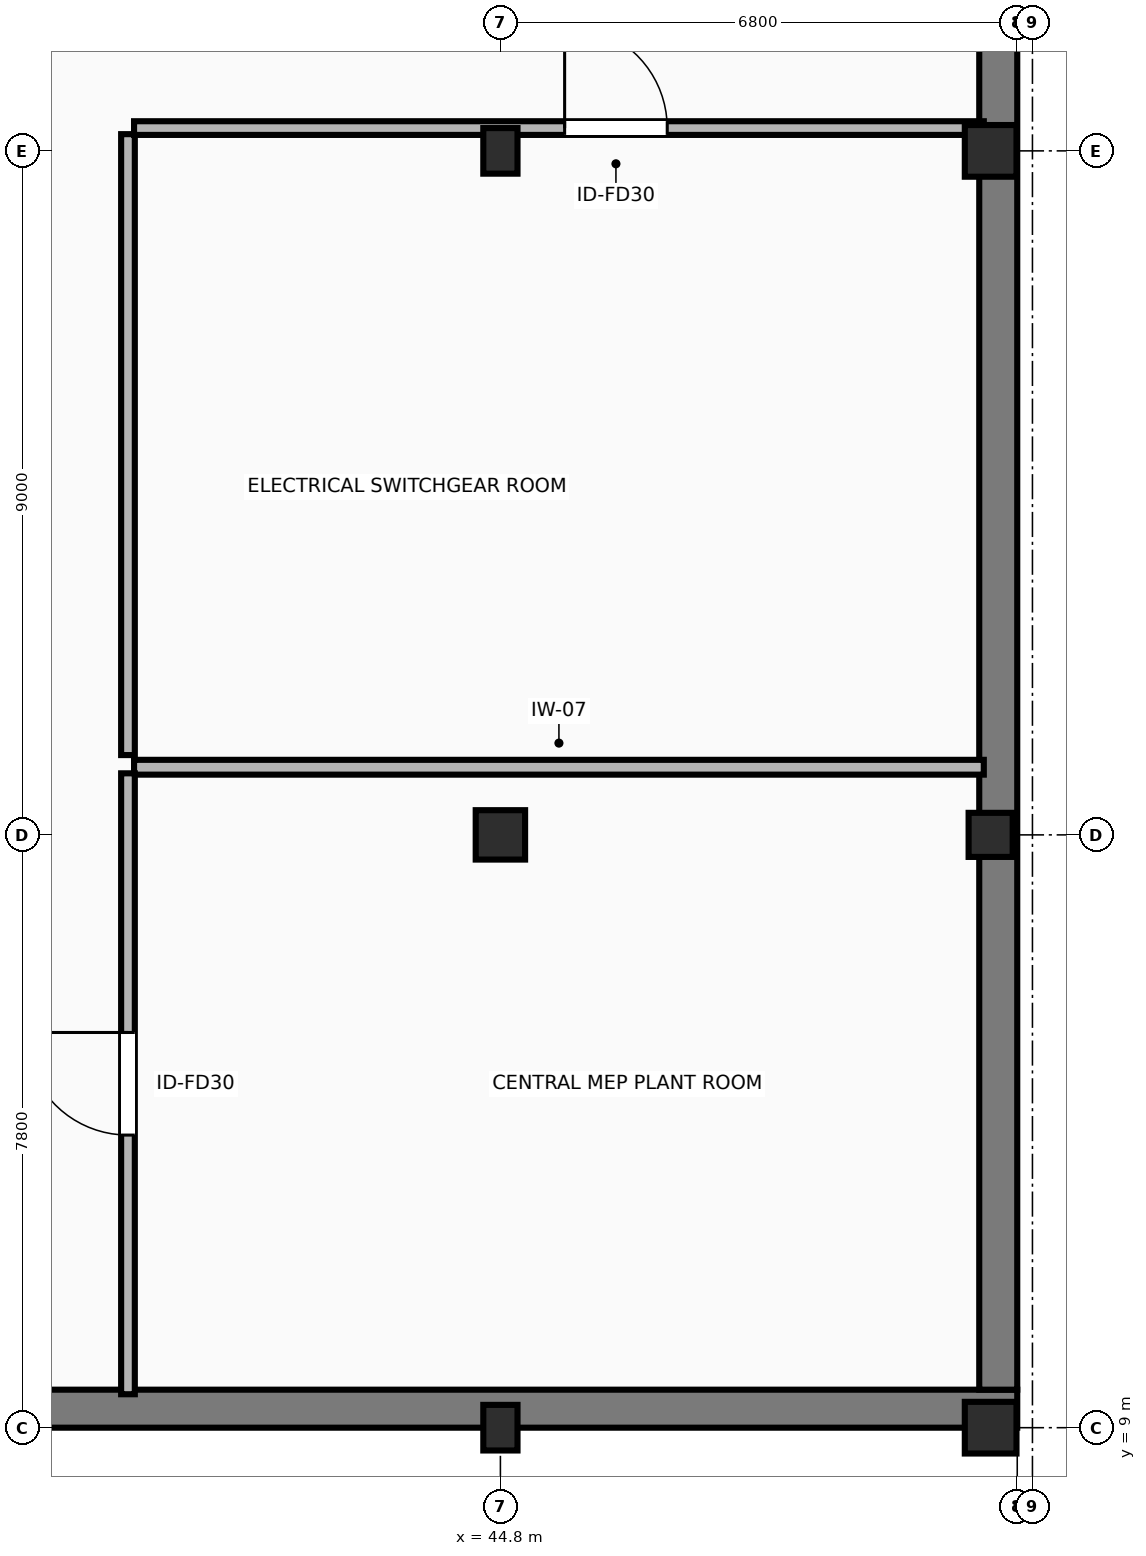
"""IFC4 building model, lengths in metres.
Left out: names, types, materials, properties, quantities, classifications, styles, units other than length and angle.
Written with IfcOpenShell. Run it as: python <this file> out.ifc"""

import sys

from ifc_helpers import new_model, si_unit, direction, frame, frame_2d, origin, origin_2d, place, context, subcontext, project, spatial, rectangle, extrude, element, fill, save


model = new_model("IFC4")
c1 = context("Model", 3, precision=1e-05, world=origin(), true_north=direction((0.0, 1.0)))
c2 = subcontext(c1, "Body", "Model", "MODEL_VIEW")
j1 = project(units=[si_unit("LENGTHUNIT", "METRE"), si_unit("PLANEANGLEUNIT", "RADIAN")], contexts=[c1])
p1 = place(None, origin())
s1 = spatial("IfcSite", under=j1, at=p1, CompositionType="ELEMENT")
p2 = place(p1, origin())
s2 = spatial("IfcBuilding", under=s1, at=p2, CompositionType="ELEMENT")
p3 = place(p2, frame((0.0, 0.0, -4.5)))
s3 = spatial("IfcBuildingStorey", under=s2, at=p3, CompositionType="ELEMENT", Elevation=-4.5)
p4 = place(p3, frame((44.8, 9.0, -0.55), z_axis=(0.0, 0.0, 1.0), x_axis=(1.0, 0.0, 0.0)))
e1 = element("IfcColumn", 1, at=p4, inside=s3, PredefinedType="COLUMN", context=c2, shape_type="SweptSolid", body=[
    extrude(rectangle(XDim=0.45, YDim=0.6, at=origin_2d()), origin(), (0.0, 0.0, 1.0), 5.05),
])
p5 = place(p3, frame((44.8, 16.8, -0.55), z_axis=(0.0, 0.0, 1.0), x_axis=(1.0, 0.0, 0.0)))
e2 = element("IfcColumn", 2, at=p5, inside=s3, PredefinedType="COLUMN", context=c2, shape_type="SweptSolid", body=[
    extrude(rectangle(XDim=0.65, YDim=0.65, at=origin_2d()), origin(), (0.0, 0.0, 1.0), 5.05),
])
p6 = place(p3, frame((44.8, 25.8, -0.55), z_axis=(0.0, 0.0, 1.0), x_axis=(1.0, 0.0, 0.0)))
e3 = element("IfcColumn", 3, at=p6, inside=s3, PredefinedType="COLUMN", context=c2, shape_type="SweptSolid", body=[
    extrude(rectangle(XDim=0.45, YDim=0.6, at=origin_2d()), origin(), (0.0, 0.0, 1.0), 5.05),
])
p7 = place(p3, frame((51.25, 9.0, -0.55), z_axis=(0.0, 0.0, 1.0), x_axis=(1.0, 0.0, 0.0)))
e4 = element("IfcColumn", 4, at=p7, inside=s3, PredefinedType="COLUMN", context=c2, shape_type="SweptSolid", body=[
    extrude(rectangle(XDim=0.68, YDim=0.68, at=origin_2d()), origin(), (0.0, 0.0, 1.0), 5.05),
])
p8 = place(p3, frame((51.25, 16.8, -0.55), z_axis=(0.0, 0.0, 1.0), x_axis=(1.0, 0.0, 0.0)))
e5 = element("IfcColumn", 5, at=p8, inside=s3, PredefinedType="COLUMN", context=c2, shape_type="SweptSolid", body=[
    extrude(rectangle(XDim=0.58, YDim=0.58, at=origin_2d()), origin(), (0.0, 0.0, 1.0), 5.05),
])
p9 = place(p3, frame((51.25, 25.8, -0.55), z_axis=(0.0, 0.0, 1.0), x_axis=(1.0, 0.0, 0.0)))
e6 = element("IfcColumn", 6, at=p9, inside=s3, PredefinedType="COLUMN", context=c2, shape_type="SweptSolid", body=[
    extrude(rectangle(XDim=0.68, YDim=0.68, at=origin_2d()), origin(), (0.0, 0.0, 1.0), 5.05),
])
p10 = place(p3, frame((11.2, 9.25, 0.0), z_axis=(0.0, 0.0, 1.0), x_axis=(1.0, 0.0, 0.0)))
e7 = element("IfcWall", 7, at=p10, inside=s3, PredefinedType="SHEAR", context=c2, shape_type="SweptSolid", body=[
    extrude(rectangle(XDim=40.4, YDim=0.5, at=frame_2d((20.2, 0.0))), origin(), (0.0, 0.0, 1.0), 4.15),
])
p11 = place(p3, frame((51.35, 43.9, 0.0), z_axis=(0.0, 0.0, 1.0), x_axis=(0.0, -1.0, 0.0)))
e8 = element("IfcWall", 8, at=p11, inside=s3, PredefinedType="SHEAR", context=c2, shape_type="SweptSolid", body=[
    extrude(rectangle(XDim=34.4, YDim=0.5, at=frame_2d((17.2, 0.0))), origin(), (0.0, 0.0, 1.0), 4.15),
])
p12 = place(p3, frame((39.98, 17.69, 0.0), z_axis=(0.0, 0.0, 1.0), x_axis=(1.0, 0.0, 0.0)))
e9 = element("IfcWall", 9, at=p12, inside=s3, PredefinedType="PARTITIONING", context=c2, shape_type="SweptSolid", body=[
    extrude(rectangle(XDim=11.18, YDim=0.195, at=frame_2d((5.59, 0.0))), origin(), (0.0, 0.0, 1.0), 4.15),
])
p13 = place(p3, frame((39.9, 9.44, 0.0), z_axis=(0.0, 0.0, 1.0), x_axis=(0.0, 1.0, 0.0)))
e10 = element("IfcWall", 10, at=p13, inside=s3, PredefinedType="PARTITIONING", context=c2, shape_type="SweptSolid", body=[
    extrude(rectangle(XDim=8.17, YDim=0.18, at=frame_2d((4.085, 0.0))), origin(), (0.0, 0.0, 1.0), 4.15),
])
p14 = place(p13, frame((3.41, 0.0, 0.0)))
e11 = element("IfcOpeningElement", 11, at=p14, cuts=e10, PredefinedType="OPENING", context=c2, shape_type="SweptSolid", body=[
    extrude(rectangle(XDim=1.35, YDim=2.2, at=frame_2d((0.675, 1.1))), frame((0.0, 0.1, 0.0), z_axis=(0.0, -1.0, 0.0), x_axis=(1.0, 0.0, 0.0)), (0.0, 0.0, 1.0), 0.2),
])
p15 = place(p3, frame((39.9, 17.85, 0.0), z_axis=(0.0, 0.0, 1.0), x_axis=(0.0, 1.0, 0.0)))
e12 = element("IfcWall", 12, at=p15, inside=s3, PredefinedType="PARTITIONING", context=c2, shape_type="SweptSolid", body=[
    extrude(rectangle(XDim=8.17, YDim=0.18, at=frame_2d((4.085, 0.0))), origin(), (0.0, 0.0, 1.0), 4.15),
])
p16 = place(p3, frame((39.98, 26.1, 0.0), z_axis=(0.0, 0.0, 1.0), x_axis=(1.0, 0.0, 0.0)))
e13 = element("IfcWall", 13, at=p16, inside=s3, PredefinedType="PARTITIONING", context=c2, shape_type="SweptSolid", body=[
    extrude(rectangle(XDim=11.18, YDim=0.18, at=frame_2d((5.59, 0.0))), origin(), (0.0, 0.0, 1.0), 3.485),
])
p17 = place(p16, frame((5.665, 0.0, 0.0)))
e14 = element("IfcOpeningElement", 14, at=p17, cuts=e13, PredefinedType="OPENING", context=c2, shape_type="SweptSolid", body=[
    extrude(rectangle(XDim=1.35, YDim=2.2, at=frame_2d((0.675, 1.1))), frame((0.0, 0.1, 0.0), z_axis=(0.0, -1.0, 0.0), x_axis=(1.0, 0.0, 0.0)), (0.0, 0.0, 1.0), 0.2),
])
p18 = place(p14, origin())
e15 = element("IfcDoor", 15, at=p18, inside=s3, OperationType="SINGLE_SWING_RIGHT", PredefinedType="DOOR", context=c2, shape_type="SweptSolid", body=[
    extrude(rectangle(XDim=1.35, YDim=2.2, at=frame_2d((0.675, 1.1))), frame((0.0, 0.025, 0.0), z_axis=(0.0, -1.0, 0.0), x_axis=(1.0, 0.0, 0.0)), (0.0, 0.0, 1.0), 0.05),
])
fill(e11, e15)
p19 = place(p17, origin())
e16 = element("IfcDoor", 16, at=p19, inside=s3, OperationType="SINGLE_SWING_LEFT", PredefinedType="DOOR", context=c2, shape_type="SweptSolid", body=[
    extrude(rectangle(XDim=1.35, YDim=2.2, at=frame_2d((0.675, 1.1))), frame((0.0, 0.025, 0.0), z_axis=(0.0, -1.0, 0.0), x_axis=(1.0, 0.0, 0.0)), (0.0, 0.0, 1.0), 0.05),
])
fill(e14, e16)
save(model, sys.argv[1])
